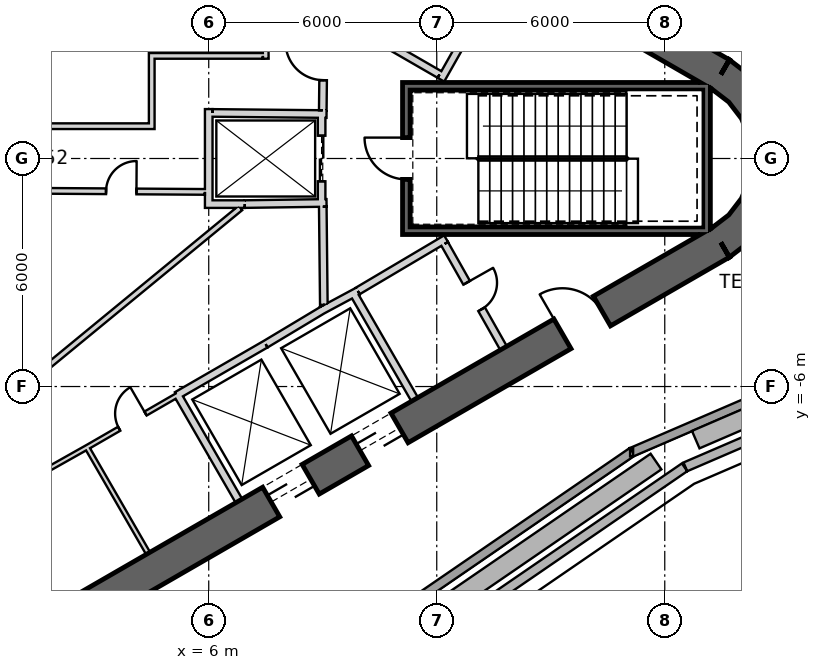
"""IFC4 building model, lengths in metres.
Left out: names, types, materials, properties, quantities, classifications, styles, units other than length and angle.
Written with IfcOpenShell. Run it as: python <this file> out.ifc"""

import sys

from ifc_helpers import new_model, si_unit, direction, frame, frame_2d, origin, place, context, subcontext, project, spatial, polyline, rectangle, outline, extrude, element, fill, save


model = new_model("IFC4")
c1 = context("Model", 3, precision=1e-05, world=origin(), true_north=direction((0.0, 1.0)))
c2 = subcontext(c1, "Body", "Model", "MODEL_VIEW")
j1 = project(units=[si_unit("LENGTHUNIT", "METRE"), si_unit("PLANEANGLEUNIT", "RADIAN")], contexts=[c1])
p1 = place(None, origin())
s1 = spatial("IfcSite", under=j1, at=p1, CompositionType="ELEMENT")
p2 = place(p1, origin())
s2 = spatial("IfcBuilding", under=s1, at=p2, CompositionType="ELEMENT")
p3 = place(p2, frame((0.0, 0.0, 420.3)))
s3 = spatial("IfcBuildingStorey", under=s2, at=p3, CompositionType="ELEMENT", Elevation=420.3)
p4 = place(p3, frame((19.475, 2.208, 0.0), z_axis=(0.0, 0.0, 1.0), x_axis=(-0.866028369851, 0.499994862586, 0.0)))
e1 = element("IfcWall", 1, at=p4, inside=s3, PredefinedType="SHEAR", context=c2, shape_type="SweptSolid", body=[
    extrude(rectangle(XDim=31.523, YDim=0.9, at=frame_2d((15.762, 0.0))), origin(), (0.0, 0.0, 1.0), 5.0),
])
p5 = place(p4, frame((3.612, 0.0, 0.0)))
e2 = element("IfcOpeningElement", 2, at=p5, cuts=e1, PredefinedType="OPENING", context=c2, shape_type="SweptSolid", body=[
    extrude(rectangle(XDim=1.2, YDim=2.4, at=frame_2d((0.6, 1.2))), frame((0.0, 0.46, 0.0), z_axis=(0.0, -1.0, 0.0), x_axis=(1.0, 0.0, 0.0)), (0.0, 0.0, 1.0), 0.92),
])
p6 = place(p4, frame((26.712, 0.0, 0.0)))
e3 = element("IfcOpeningElement", 3, at=p6, cuts=e1, PredefinedType="OPENING", context=c2, shape_type="SweptSolid", body=[
    extrude(rectangle(XDim=1.2, YDim=2.4, at=frame_2d((0.6, 1.2))), frame((0.0, 0.46, 0.0), z_axis=(0.0, -1.0, 0.0), x_axis=(1.0, 0.0, 0.0)), (0.0, 0.0, 1.0), 0.92),
])
p7 = place(p3, frame((-7.825, -17.97, 0.0), z_axis=(0.0, 0.0, 1.0), x_axis=(0.866028369851, 0.499994862586, 0.0)))
e4 = element("IfcWall", 4, at=p7, inside=s3, PredefinedType="SHEAR", context=c2, shape_type="SweptSolid", body=[
    extrude(rectangle(XDim=31.523, YDim=0.9, at=frame_2d((15.762, 0.0))), origin(), (0.0, 0.0, 1.0), 5.0),
])
p8 = place(p7, frame((17.862, 0.0, 0.0)))
e5 = element("IfcOpeningElement", 5, at=p8, cuts=e4, PredefinedType="OPENING", context=c2, shape_type="SweptSolid", body=[
    extrude(rectangle(XDim=1.2, YDim=2.4, at=frame_2d((0.6, 1.2))), frame((0.0, 0.46, 0.0), z_axis=(0.0, -1.0, 0.0), x_axis=(1.0, 0.0, 0.0)), (0.0, 0.0, 1.0), 0.92),
])
p9 = place(p7, frame((20.562, 0.0, 0.0)))
e6 = element("IfcOpeningElement", 6, at=p9, cuts=e4, PredefinedType="OPENING", context=c2, shape_type="SweptSolid", body=[
    extrude(rectangle(XDim=1.2, YDim=2.4, at=frame_2d((0.6, 1.2))), frame((0.0, 0.46, 0.0), z_axis=(0.0, -1.0, 0.0), x_axis=(1.0, 0.0, 0.0)), (0.0, 0.0, 1.0), 0.92),
])
p10 = place(p7, frame((26.712, 0.0, 0.0)))
e7 = element("IfcOpeningElement", 7, at=p10, cuts=e4, PredefinedType="OPENING", context=c2, shape_type="SweptSolid", body=[
    extrude(rectangle(XDim=1.2, YDim=2.4, at=frame_2d((0.6, 1.2))), frame((0.0, 0.46, 0.0), z_axis=(0.0, -1.0, 0.0), x_axis=(1.0, 0.0, 0.0)), (0.0, 0.0, 1.0), 0.92),
])
p11 = place(p7, frame((3.612, 0.0, 0.0)))
e8 = element("IfcOpeningElement", 8, at=p11, cuts=e4, PredefinedType="OPENING", context=c2, shape_type="SweptSolid", body=[
    extrude(rectangle(XDim=1.2, YDim=2.4, at=frame_2d((0.6, 1.2))), frame((0.0, 0.46, 0.0), z_axis=(0.0, -1.0, 0.0), x_axis=(1.0, 0.0, 0.0)), (0.0, 0.0, 1.0), 0.92),
])
p12 = place(p3, origin())
e9 = element("IfcWall", 9, at=p12, inside=s3, PredefinedType="SHEAR", context=c2, shape_type="SweptSolid", body=[
    extrude(outline(polyline([(19.7, -2.598), (20.321, -2.121), (20.798, -1.5), (21.098, -0.777), (21.2, 0.0), (21.098, 0.777), (20.798, 1.5), (20.321, 2.121), (19.7, 2.598), (19.25, 1.819), (19.685, 1.485), (20.019, 1.05), (20.229, 0.543), (20.3, 0.0), (20.229, -0.543), (20.019, -1.05), (19.685, -1.485), (19.25, -1.819), (19.7, -2.598)])), origin(), (0.0, 0.0, 1.0), 5.0),
])
p13 = place(p3, frame((-1.01, -20.178, 0.0), z_axis=(0.0, 0.0, 1.0), x_axis=(0.824477208683, 0.565895160221, 0.0)))
e10 = element("IfcWall", 10, at=p13, inside=s3, PredefinedType="SOLIDWALL", context=c2, shape_type="SweptSolid", body=[
    extrude(rectangle(XDim=21.999, YDim=0.24, at=frame_2d((11.0, 0.0))), origin(), (0.0, 0.0, 1.0), 4.75),
])
p14 = place(p3, frame((17.127, -7.729, 0.0), z_axis=(0.0, 0.0, 1.0), x_axis=(0.918306180975, 0.395870885497, 0.0)))
e11 = element("IfcWall", 11, at=p14, inside=s3, PredefinedType="SOLIDWALL", context=c2, shape_type="SweptSolid", body=[
    extrude(rectangle(XDim=7.349, YDim=0.24, at=frame_2d((3.675, 0.0))), origin(), (0.0, 0.0, 1.0), 4.75),
])
p15 = place(p3, frame((25.85, -4.964, 0.04), z_axis=(0.0, 0.0, 1.0), x_axis=(-0.918309857205, -0.395862357594, 0.0)))
e12 = element("IfcWall", 12, at=p15, inside=s3, PredefinedType="PARAPET", context=c2, shape_type="SweptSolid", body=[
    extrude(rectangle(XDim=7.958, YDim=0.25, at=frame_2d((3.979, 0.0))), origin(), (0.0, 0.0, 1.0), 1.2),
])
p16 = place(p3, frame((18.521, -8.125, 0.04), z_axis=(0.0, 0.0, 1.0), x_axis=(-0.82448023265, -0.565890754447, 0.0)))
e13 = element("IfcWall", 13, at=p16, inside=s3, PredefinedType="PARAPET", context=c2, shape_type="SweptSolid", body=[
    extrude(rectangle(XDim=24.007, YDim=0.25, at=frame_2d((12.003, 0.0))), origin(), (0.0, 0.0, 1.0), 1.2),
])
p17 = place(p3, frame((25.006, -4.728, 0.04), z_axis=(0.0, 0.0, 1.0), x_axis=(-0.918311377088, -0.395858831795, 0.0)))
e14 = element("IfcWall", 14, at=p17, inside=s3, PredefinedType="PARAPET", context=c2, shape_type="SweptSolid", body=[
    extrude(rectangle(XDim=6.742, YDim=0.5, at=frame_2d((3.371, 0.0))), origin(), (0.0, 0.0, 1.0), 0.6),
])
p18 = place(p3, frame((17.769, -7.974, 0.04), z_axis=(0.0, 0.0, 1.0), x_axis=(-0.824477548628, -0.565894664941, 0.0)))
e15 = element("IfcWall", 15, at=p18, inside=s3, PredefinedType="PARAPET", context=c2, shape_type="SweptSolid", body=[
    extrude(rectangle(XDim=22.831, YDim=0.5, at=frame_2d((11.416, 0.0))), origin(), (0.0, 0.0, 1.0), 0.6),
])
p19 = place(p3, frame((6.795, -9.01, 0.0), z_axis=(0.0, 0.0, 1.0), x_axis=(-0.499984717929, 0.866034226713, 0.0)))
e16 = element("IfcWall", 16, at=p19, inside=s3, PredefinedType="PLUMBINGWALL", context=c2, shape_type="SweptSolid", body=[
    extrude(rectangle(XDim=3.25, YDim=0.2, at=frame_2d((1.625, 0.0))), origin(), (0.0, 0.0, 1.0), 4.75),
])
p20 = place(p3, frame((5.159, -6.236, 0.0), z_axis=(0.0, 0.0, 1.0), x_axis=(0.866036505625, 0.499980770555, 0.0)))
e17 = element("IfcWall", 17, at=p20, inside=s3, PredefinedType="PLUMBINGWALL", context=c2, shape_type="SweptSolid", body=[
    extrude(rectangle(XDim=2.7, YDim=0.2, at=frame_2d((1.35, 0.0))), origin(), (0.0, 0.0, 1.0), 4.75),
])
p21 = place(p3, frame((9.795, -3.525, 0.0), z_axis=(0.0, 0.0, 1.0), x_axis=(0.499984717929, -0.866034226713, 0.0)))
e18 = element("IfcWall", 18, at=p21, inside=s3, PredefinedType="PLUMBINGWALL", context=c2, shape_type="SweptSolid", body=[
    extrude(rectangle(XDim=3.25, YDim=0.2, at=frame_2d((1.625, 0.0))), origin(), (0.0, 0.0, 1.0), 4.75),
])
p22 = place(p3, frame((8.974, -3.999, 0.0), z_axis=(0.0, 0.0, 1.0), x_axis=(0.880907015104, 0.473289373154, 0.0)))
e19 = element("IfcWall", 19, at=p22, inside=s3, PredefinedType="PLUMBINGWALL", context=c2, shape_type="SweptSolid", body=[
    extrude(rectangle(XDim=1.078, YDim=0.2, at=frame_2d((0.539, 0.0))), origin(), (0.0, 0.0, 1.0), 4.75),
])
p23 = place(p3, frame((7.497, -4.886, 0.0), z_axis=(0.0, 0.0, 1.0), x_axis=(0.857516281273, 0.51445682749, 0.0)))
e20 = element("IfcWall", 20, at=p23, inside=s3, PredefinedType="PLUMBINGWALL", context=c2, shape_type="SweptSolid", body=[
    extrude(rectangle(XDim=1.845, YDim=0.2, at=frame_2d((0.922, 0.0))), origin(), (0.0, 0.0, 1.0), 4.75),
])
p24 = place(p3, frame((19.2, 1.9, -0.25), z_axis=(0.0, 0.0, 1.0), x_axis=(-1.0, 0.0, 0.0)))
e21 = element("IfcWall", 21, at=p24, inside=s3, PredefinedType="SHEAR", context=c2, shape_type="SweptSolid", body=[
    extrude(rectangle(XDim=8.1, YDim=0.2, at=frame_2d((4.05, 0.0))), origin(), (0.0, 0.0, 1.0), 5.0),
])
p25 = place(p3, frame((19.1, -2.0, -0.25), z_axis=(0.0, 0.0, 1.0), x_axis=(0.0, 1.0, 0.0)))
e22 = element("IfcWall", 22, at=p25, inside=s3, PredefinedType="SHEAR", context=c2, shape_type="SweptSolid", body=[
    extrude(rectangle(XDim=3.8, YDim=0.2, at=frame_2d((1.9, 0.0))), origin(), (0.0, 0.0, 1.0), 5.0),
])
p26 = place(p3, frame((11.1, -1.9, -0.25), z_axis=(0.0, 0.0, 1.0), x_axis=(1.0, 0.0, 0.0)))
e23 = element("IfcWall", 23, at=p26, inside=s3, PredefinedType="SHEAR", context=c2, shape_type="SweptSolid", body=[
    extrude(rectangle(XDim=7.9, YDim=0.2, at=frame_2d((3.95, 0.0))), origin(), (0.0, 0.0, 1.0), 5.0),
])
p27 = place(p3, frame((11.2, -1.8, -0.25), z_axis=(0.0, 0.0, 1.0), x_axis=(0.0, 1.0, 0.0)))
e24 = element("IfcWall", 24, at=p27, inside=s3, PredefinedType="SHEAR", context=c2, shape_type="SweptSolid", body=[
    extrude(rectangle(XDim=3.6, YDim=0.2, at=frame_2d((1.8, 0.0))), origin(), (0.0, 0.0, 1.0), 5.0),
])
p28 = place(p27, frame((1.25, 0.0, 0.25)))
e25 = element("IfcOpeningElement", 25, at=p28, cuts=e24, PredefinedType="OPENING", context=c2, shape_type="SweptSolid", body=[
    extrude(rectangle(XDim=1.1, YDim=2.1, at=frame_2d((0.55, 1.05))), frame((0.0, 0.11, 0.0), z_axis=(0.0, -1.0, 0.0), x_axis=(1.0, 0.0, 0.0)), (0.0, 0.0, 1.0), 0.22),
])
p29 = place(p3, frame((8.97, 1.2, 0.0), z_axis=(0.0, 0.0, 1.0), x_axis=(0.0, -1.0, 0.0)))
e26 = element("IfcWall", 26, at=p29, inside=s3, PredefinedType="PLUMBINGWALL", context=c2, shape_type="SweptSolid", body=[
    extrude(rectangle(XDim=2.4, YDim=0.2, at=frame_2d((1.2, 0.0))), origin(), (0.0, 0.0, 1.0), 4.75),
])
p30 = place(p29, frame((0.6, 0.0, 0.0)))
e27 = element("IfcOpeningElement", 27, at=p30, cuts=e26, PredefinedType="OPENING", context=c2, shape_type="SweptSolid", body=[
    extrude(rectangle(XDim=1.2, YDim=2.4, at=frame_2d((0.6, 1.2))), frame((0.0, 0.11, 0.0), z_axis=(0.0, -1.0, 0.0), x_axis=(1.0, 0.0, 0.0)), (0.0, 0.0, 1.0), 0.22),
])
p31 = place(p3, frame((6.949, -1.2, 0.0), z_axis=(0.0, 0.0, 1.0), x_axis=(-1.0, 0.0, 0.0)))
e28 = element("IfcWall", 28, at=p31, inside=s3, PredefinedType="PLUMBINGWALL", context=c2, shape_type="SweptSolid", body=[
    extrude(rectangle(XDim=1.049, YDim=0.2, at=frame_2d((0.524, 0.0))), origin(), (0.0, 0.0, 1.0), 4.75),
])
p32 = place(p3, frame((6.0, -1.1, 0.0), z_axis=(0.0, 0.0, 1.0), x_axis=(0.0, 1.0, 0.0)))
e29 = element("IfcWall", 29, at=p32, inside=s3, PredefinedType="PLUMBINGWALL", context=c2, shape_type="SweptSolid", body=[
    extrude(rectangle(XDim=2.4, YDim=0.2, at=frame_2d((1.2, 0.0))), origin(), (0.0, 0.0, 1.0), 4.75),
])
p33 = place(p3, frame((9.1, -1.168, 0.0), z_axis=(0.0, 0.0, 1.0), x_axis=(-0.999896137355, -0.014412303875, 0.0)))
e30 = element("IfcWall", 30, at=p33, inside=s3, PredefinedType="PLUMBINGWALL", context=c2, shape_type="SweptSolid", body=[
    extrude(rectangle(XDim=2.151, YDim=0.2, at=frame_2d((1.076, 0.0))), origin(), (0.0, 0.0, 1.0), 4.75),
])
p34 = place(p3, frame((9.1, 1.169, 0.0), z_axis=(0.0, 0.0, 1.0), x_axis=(-0.99994990606, 0.010009264196, 0.0)))
e31 = element("IfcWall", 31, at=p34, inside=s3, PredefinedType="PLUMBINGWALL", context=c2, shape_type="SweptSolid", body=[
    extrude(rectangle(XDim=3.0, YDim=0.2, at=frame_2d((1.5, 0.0))), origin(), (0.0, 0.0, 1.0), 4.75),
])
p35 = place(p3, frame((12.11, 2.073, 0.0), z_axis=(0.0, 0.0, 1.0), x_axis=(0.49196600604, 0.870614408852, 0.0)))
e32 = element("IfcWall", 32, at=p35, inside=s3, PredefinedType="PARTITIONING", context=c2, shape_type="SweptSolid", body=[
    extrude(rectangle(XDim=3.35, YDim=0.2, at=frame_2d((1.675, 0.0))), origin(), (0.0, 0.0, 1.0), 4.75),
])
p36 = place(p3, frame((8.974, 3.999, 0.0), z_axis=(0.0, 0.0, 1.0), x_axis=(0.86601284211, -0.500021756827, 0.0)))
e33 = element("IfcWall", 33, at=p36, inside=s3, PredefinedType="PARTITIONING", context=c2, shape_type="SweptSolid", body=[
    extrude(rectangle(XDim=3.577, YDim=0.2, at=frame_2d((1.789, 0.0))), origin(), (0.0, 0.0, 1.0), 4.75),
])
p37 = place(p3, frame((4.405, -10.389, 0.0), z_axis=(0.0, 0.0, 1.0), x_axis=(-0.500017246033, 0.866015446554, 0.0)))
e34 = element("IfcWall", 34, at=p37, inside=s3, PredefinedType="PARTITIONING", context=c2, shape_type="SweptSolid", body=[
    extrude(rectangle(XDim=3.25, YDim=0.12, at=frame_2d((1.625, 0.0))), origin(), (0.0, 0.0, 1.0), 4.75),
])
p38 = place(p3, frame((0.493, -8.896, 0.0), z_axis=(0.0, 0.0, 1.0), x_axis=(0.871414386141, 0.490547620141, 0.0)))
e35 = element("IfcWall", 35, at=p38, inside=s3, PredefinedType="PARTITIONING", context=c2, shape_type="SweptSolid", body=[
    extrude(rectangle(XDim=2.671, YDim=0.12, at=frame_2d((1.335, 0.0))), origin(), (0.0, 0.0, 1.0), 4.75),
])
p39 = place(p3, frame((2.821, -7.586, 0.0), z_axis=(0.0, 0.0, 1.0), x_axis=(0.866019956843, 0.50000943426, 0.0)))
e36 = element("IfcWall", 36, at=p39, inside=s3, PredefinedType="PARTITIONING", context=c2, shape_type="SweptSolid", body=[
    extrude(rectangle(XDim=2.7, YDim=0.12, at=frame_2d((1.35, 0.0))), origin(), (0.0, 0.0, 1.0), 4.75),
])
p40 = place(p39, frame((0.95, 0.0, 0.0)))
e37 = element("IfcOpeningElement", 37, at=p40, cuts=e36, PredefinedType="OPENING", context=c2, shape_type="SweptSolid", body=[
    extrude(rectangle(XDim=0.8, YDim=2.1, at=frame_2d((0.4, 1.05))), frame((0.0, 0.07, 0.0), z_axis=(0.0, -1.0, 0.0), x_axis=(1.0, 0.0, 0.0)), (0.0, 0.0, 1.0), 0.14),
])
p41 = place(p3, frame((12.245, -2.109, 0.0), z_axis=(0.0, 0.0, 1.0), x_axis=(-0.860414880418, -0.509594185166, 0.0)))
e38 = element("IfcWall", 38, at=p41, inside=s3, PredefinedType="PARTITIONING", context=c2, shape_type="SweptSolid", body=[
    extrude(rectangle(XDim=2.7, YDim=0.2, at=frame_2d((1.35, 0.0))), origin(), (0.0, 0.0, 1.0), 4.75),
])
p42 = place(p3, frame((13.758, -4.99, 0.0), z_axis=(0.0, 0.0, 1.0), x_axis=(-0.491993409184, 0.87059892334, 0.0)))
e39 = element("IfcWall", 39, at=p42, inside=s3, PredefinedType="PARTITIONING", context=c2, shape_type="SweptSolid", body=[
    extrude(rectangle(XDim=3.15, YDim=0.2, at=frame_2d((1.575, 0.0))), origin(), (0.0, 0.0, 1.0), 4.75),
])
p43 = place(p42, frame((1.175, 0.0, 0.0)))
e40 = element("IfcOpeningElement", 40, at=p43, cuts=e39, PredefinedType="OPENING", context=c2, shape_type="SweptSolid", body=[
    extrude(rectangle(XDim=0.8, YDim=2.1, at=frame_2d((0.4, 1.05))), frame((0.0, 0.11, 0.0), z_axis=(0.0, -1.0, 0.0), x_axis=(1.0, 0.0, 0.0)), (0.0, 0.0, 1.0), 0.22),
])
p44 = place(p3, frame((9.029, -3.851, 0.0), z_axis=(0.0, 0.0, 1.0), x_axis=(-0.010784614026, 0.999941844359, 0.0)))
e41 = element("IfcWall", 41, at=p44, inside=s3, PredefinedType="PARTITIONING", context=c2, shape_type="SweptSolid", body=[
    extrude(rectangle(XDim=2.581, YDim=0.2, at=frame_2d((1.291, 0.0))), origin(), (0.0, 0.0, 1.0), 4.75),
])
p45 = place(p3, frame((9.001, 1.27, 0.0), z_axis=(0.0, 0.0, 1.0), x_axis=(0.010780534828, 0.999941888346, 0.0)))
e42 = element("IfcWall", 42, at=p45, inside=s3, PredefinedType="PARTITIONING", context=c2, shape_type="SweptSolid", body=[
    extrude(rectangle(XDim=2.582, YDim=0.2, at=frame_2d((1.291, 0.0))), origin(), (0.0, 0.0, 1.0), 4.75),
])
p46 = place(p45, frame((0.791, 0.0, 0.0)))
e43 = element("IfcOpeningElement", 43, at=p46, cuts=e42, PredefinedType="OPENING", context=c2, shape_type="SweptSolid", body=[
    extrude(rectangle(XDim=1.0, YDim=2.1, at=frame_2d((0.5, 1.05))), frame((0.0, 0.11, 0.0), z_axis=(0.0, -1.0, 0.0), x_axis=(1.0, 0.0, 0.0)), (0.0, 0.0, 1.0), 0.22),
])
p47 = place(p3, frame((6.834, -1.302, 0.0), z_axis=(0.0, 0.0, 1.0), x_axis=(-0.772564687607, -0.634936062499, 0.0)))
e44 = element("IfcWall", 44, at=p47, inside=s3, PredefinedType="PLUMBINGWALL", context=c2, shape_type="SweptSolid", body=[
    extrude(rectangle(XDim=10.457, YDim=0.15, at=frame_2d((5.229, 0.0))), origin(), (0.0, 0.0, 1.0), 4.75),
])
p48 = place(p3, frame((5.9, -0.879, 0.0), z_axis=(0.0, 0.0, 1.0), x_axis=(-0.999978605844, 0.006541242613, 0.0)))
e45 = element("IfcWall", 45, at=p48, inside=s3, PredefinedType="PLUMBINGWALL", context=c2, shape_type="SweptSolid", body=[
    extrude(rectangle(XDim=4.404, YDim=0.15, at=frame_2d((2.202, 0.0))), origin(), (0.0, 0.0, 1.0), 4.75),
])
p49 = place(p48, frame((1.802, 0.0, 0.0)))
e46 = element("IfcOpeningElement", 46, at=p49, cuts=e45, PredefinedType="OPENING", context=c2, shape_type="SweptSolid", body=[
    extrude(rectangle(XDim=0.8, YDim=2.1, at=frame_2d((0.4, 1.05))), frame((0.0, 0.085, 0.0), z_axis=(0.0, -1.0, 0.0), x_axis=(1.0, 0.0, 0.0)), (0.0, 0.0, 1.0), 0.17),
])
p50 = place(p3, frame((7.501, 2.625, 0.0), z_axis=(0.0, 0.0, 1.0), x_axis=(-0.011799927307, 0.999930378434, 0.0)))
e47 = element("IfcWall", 47, at=p50, inside=s3, PredefinedType="PLUMBINGWALL", context=c2, shape_type="SweptSolid", body=[
    extrude(rectangle(XDim=2.152, YDim=0.15, at=frame_2d((1.076, 0.0))), origin(), (0.0, 0.0, 1.0), 4.75),
])
p51 = place(p3, frame((4.425, 2.7, 0.0), z_axis=(0.0, 0.0, 1.0), x_axis=(1.0, 0.0, 0.0)))
e48 = element("IfcWall", 48, at=p51, inside=s3, PredefinedType="PLUMBINGWALL", context=c2, shape_type="SweptSolid", body=[
    extrude(rectangle(XDim=3.0, YDim=0.15, at=frame_2d((1.5, 0.0))), origin(), (0.0, 0.0, 1.0), 4.75),
])
p52 = place(p3, frame((4.5, 0.775, 0.0), z_axis=(0.0, 0.0, 1.0), x_axis=(0.0, 1.0, 0.0)))
e49 = element("IfcWall", 49, at=p52, inside=s3, PredefinedType="PLUMBINGWALL", context=c2, shape_type="SweptSolid", body=[
    extrude(rectangle(XDim=1.85, YDim=0.15, at=frame_2d((0.925, 0.0))), origin(), (0.0, 0.0, 1.0), 4.75),
])
p53 = place(p3, frame((1.342, 0.85, 0.0), z_axis=(0.0, 0.0, 1.0), x_axis=(1.0, 0.0, 0.0)))
e50 = element("IfcWall", 50, at=p53, inside=s3, PredefinedType="PLUMBINGWALL", context=c2, shape_type="SweptSolid", body=[
    extrude(rectangle(XDim=3.083, YDim=0.15, at=frame_2d((1.542, 0.0))), origin(), (0.0, 0.0, 1.0), 4.75),
])
p54 = place(p28, origin())
e51 = element("IfcDoor", 51, at=p54, inside=s3, OperationType="SINGLE_SWING_RIGHT", PredefinedType="USERDEFINED", context=c2, shape_type="SweptSolid", body=[
    extrude(rectangle(XDim=1.1, YDim=2.1, at=frame_2d((0.55, 1.05))), frame((0.0, 0.025, 0.0), z_axis=(0.0, -1.0, 0.0), x_axis=(1.0, 0.0, 0.0)), (0.0, 0.0, 1.0), 0.05),
])
fill(e25, e51)
p55 = place(p46, origin())
e52 = element("IfcDoor", 52, at=p55, inside=s3, OperationType="SINGLE_SWING_RIGHT", PredefinedType="USERDEFINED", context=c2, shape_type="SweptSolid", body=[
    extrude(rectangle(XDim=1.0, YDim=2.1, at=frame_2d((0.5, 1.05))), frame((0.0, 0.025, 0.0), z_axis=(0.0, -1.0, 0.0), x_axis=(1.0, 0.0, 0.0)), (0.0, 0.0, 1.0), 0.05),
])
fill(e43, e52)
p56 = place(p30, origin())
e53 = element("IfcDoor", 53, at=p56, inside=s3, OperationType="SLIDING_TO_LEFT", PredefinedType="USERDEFINED", context=c2, shape_type="SweptSolid", body=[
    extrude(rectangle(XDim=1.2, YDim=2.4, at=frame_2d((0.6, 1.2))), frame((0.0, 0.025, 0.0), z_axis=(0.0, -1.0, 0.0), x_axis=(1.0, 0.0, 0.0)), (0.0, 0.0, 1.0), 0.05),
])
fill(e27, e53)
p57 = place(p49, origin())
e54 = element("IfcDoor", 54, at=p57, inside=s3, OperationType="SINGLE_SWING_LEFT", PredefinedType="USERDEFINED", context=c2, shape_type="SweptSolid", body=[
    extrude(rectangle(XDim=0.8, YDim=2.1, at=frame_2d((0.4, 1.05))), frame((0.0, 0.025, 0.0), z_axis=(0.0, -1.0, 0.0), x_axis=(1.0, 0.0, 0.0)), (0.0, 0.0, 1.0), 0.05),
])
fill(e46, e54)
p58 = place(p40, origin())
e55 = element("IfcDoor", 55, at=p58, inside=s3, OperationType="SINGLE_SWING_RIGHT", PredefinedType="USERDEFINED", context=c2, shape_type="SweptSolid", body=[
    extrude(rectangle(XDim=0.8, YDim=2.1, at=frame_2d((0.4, 1.05))), frame((0.0, 0.025, 0.0), z_axis=(0.0, -1.0, 0.0), x_axis=(1.0, 0.0, 0.0)), (0.0, 0.0, 1.0), 0.05),
])
fill(e37, e55)
p59 = place(p43, origin())
e56 = element("IfcDoor", 56, at=p59, inside=s3, OperationType="SINGLE_SWING_RIGHT", PredefinedType="USERDEFINED", context=c2, shape_type="SweptSolid", body=[
    extrude(rectangle(XDim=0.8, YDim=2.1, at=frame_2d((0.4, 1.05))), frame((0.0, 0.025, 0.0), z_axis=(0.0, -1.0, 0.0), x_axis=(1.0, 0.0, 0.0)), (0.0, 0.0, 1.0), 0.05),
])
fill(e40, e56)
p60 = place(p8, origin())
e57 = element("IfcDoor", 57, at=p60, inside=s3, OperationType="SLIDING_TO_LEFT", PredefinedType="USERDEFINED", context=c2, shape_type="SweptSolid", body=[
    extrude(rectangle(XDim=1.2, YDim=2.4, at=frame_2d((0.6, 1.2))), frame((0.0, 0.025, 0.0), z_axis=(0.0, -1.0, 0.0), x_axis=(1.0, 0.0, 0.0)), (0.0, 0.0, 1.0), 0.05),
])
fill(e5, e57)
p61 = place(p9, origin())
e58 = element("IfcDoor", 58, at=p61, inside=s3, OperationType="SLIDING_TO_LEFT", PredefinedType="USERDEFINED", context=c2, shape_type="SweptSolid", body=[
    extrude(rectangle(XDim=1.2, YDim=2.4, at=frame_2d((0.6, 1.2))), frame((0.0, 0.025, 0.0), z_axis=(0.0, -1.0, 0.0), x_axis=(1.0, 0.0, 0.0)), (0.0, 0.0, 1.0), 0.05),
])
fill(e6, e58)
p62 = place(p10, origin())
e59 = element("IfcDoor", 59, at=p62, inside=s3, OperationType="SINGLE_SWING_LEFT", PredefinedType="USERDEFINED", context=c2, shape_type="SweptSolid", body=[
    extrude(rectangle(XDim=1.2, YDim=2.4, at=frame_2d((0.6, 1.2))), frame((0.0, 0.025, 0.0), z_axis=(0.0, -1.0, 0.0), x_axis=(1.0, 0.0, 0.0)), (0.0, 0.0, 1.0), 0.05),
])
fill(e7, e59)
save(model, sys.argv[1])
